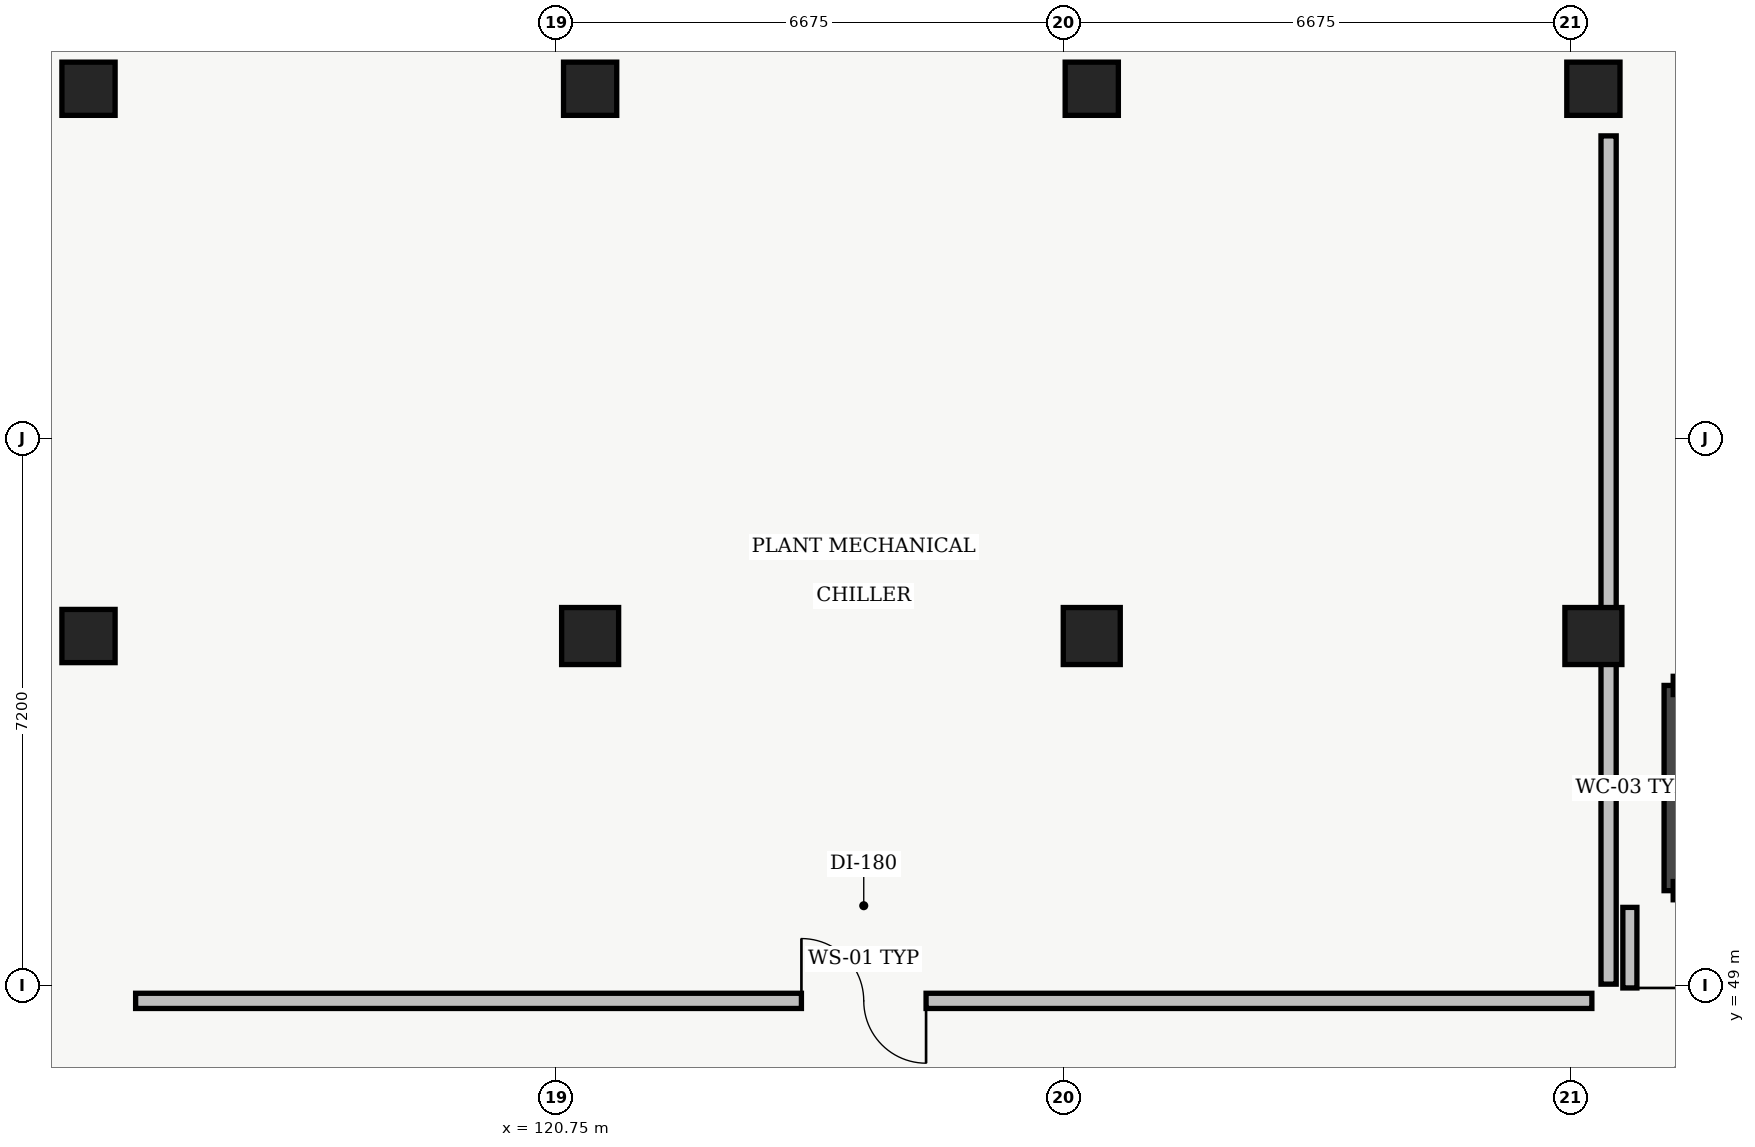
"""IFC4 building model, lengths in metres.
Left out: names, types, materials, properties, quantities, classifications, styles, units other than length and angle.
Written with IfcOpenShell. Run it as: python <this file> out.ifc"""

import sys

from ifc_helpers import new_model, si_unit, direction, frame, frame_2d, origin, origin_2d, place, context, subcontext, project, spatial, rectangle, extrude, element, fill, save


model = new_model("IFC4")
c1 = context("Model", 3, precision=1e-05, world=origin(), true_north=direction((0.0, 1.0)))
c2 = subcontext(c1, "Body", "Model", "MODEL_VIEW")
j1 = project(units=[si_unit("LENGTHUNIT", "METRE"), si_unit("PLANEANGLEUNIT", "RADIAN")], contexts=[c1])
p1 = place(None, origin())
s1 = spatial("IfcSite", under=j1, at=p1, CompositionType="ELEMENT")
p2 = place(p1, origin())
s2 = spatial("IfcBuilding", under=s1, at=p2, CompositionType="ELEMENT")
p3 = place(p2, frame((0.0, 0.0, -4.8)))
s3 = spatial("IfcBuildingStorey", under=s2, at=p3, CompositionType="ELEMENT", Elevation=-4.8)
for number, where, z_axis, x_axis in (
    (1, (114.6, 53.6, 0.0), (0.0, 0.0, 1.0), (1.0, 0.0, 0.0)),
    (2, (114.6, 60.8, 0.0), (0.0, 0.0, 1.0), (1.0, 0.0, 0.0)),
):
    element("IfcColumn", number, at=place(p3, frame(where, z_axis=z_axis, x_axis=x_axis)), inside=s3, PredefinedType="COLUMN", context=c2, shape_type="SweptSolid", body=[
        extrude(rectangle(XDim=0.7, YDim=0.7, at=origin_2d()), origin(), (0.0, 0.0, 1.0), 4.59),
    ])
p4 = place(p3, frame((121.2, 53.6, 0.0), z_axis=(0.0, 0.0, 1.0), x_axis=(1.0, 0.0, 0.0)))
e3 = element("IfcColumn", 3, at=p4, inside=s3, PredefinedType="COLUMN", context=c2, shape_type="SweptSolid", body=[
    extrude(rectangle(XDim=0.75, YDim=0.75, at=origin_2d()), origin(), (0.0, 0.0, 1.0), 4.59),
])
p5 = place(p3, frame((121.2, 60.8, 0.0), z_axis=(0.0, 0.0, 1.0), x_axis=(1.0, 0.0, 0.0)))
e4 = element("IfcColumn", 4, at=p5, inside=s3, PredefinedType="COLUMN", context=c2, shape_type="SweptSolid", body=[
    extrude(rectangle(XDim=0.7, YDim=0.7, at=origin_2d()), origin(), (0.0, 0.0, 1.0), 4.59),
])
p6 = place(p3, frame((127.8, 53.6, 0.0), z_axis=(0.0, 0.0, 1.0), x_axis=(1.0, 0.0, 0.0)))
e5 = element("IfcColumn", 5, at=p6, inside=s3, PredefinedType="COLUMN", context=c2, shape_type="SweptSolid", body=[
    extrude(rectangle(XDim=0.75, YDim=0.75, at=origin_2d()), origin(), (0.0, 0.0, 1.0), 4.59),
])
p7 = place(p3, frame((127.8, 60.8, 0.0), z_axis=(0.0, 0.0, 1.0), x_axis=(1.0, 0.0, 0.0)))
e6 = element("IfcColumn", 6, at=p7, inside=s3, PredefinedType="COLUMN", context=c2, shape_type="SweptSolid", body=[
    extrude(rectangle(XDim=0.7, YDim=0.7, at=origin_2d()), origin(), (0.0, 0.0, 1.0), 4.59),
])
p8 = place(p3, frame((134.4, 53.6, 0.0), z_axis=(0.0, 0.0, 1.0), x_axis=(1.0, 0.0, 0.0)))
e7 = element("IfcColumn", 7, at=p8, inside=s3, PredefinedType="COLUMN", context=c2, shape_type="SweptSolid", body=[
    extrude(rectangle(XDim=0.75, YDim=0.75, at=origin_2d()), origin(), (0.0, 0.0, 1.0), 4.59),
])
p9 = place(p3, frame((134.4, 60.8, 0.0), z_axis=(0.0, 0.0, 1.0), x_axis=(1.0, 0.0, 0.0)))
e8 = element("IfcColumn", 8, at=p9, inside=s3, PredefinedType="COLUMN", context=c2, shape_type="SweptSolid", body=[
    extrude(rectangle(XDim=0.7, YDim=0.7, at=origin_2d()), origin(), (0.0, 0.0, 1.0), 4.59),
])
p10 = place(p3, frame((135.45, 50.25, 0.0), z_axis=(0.0, 0.0, 1.0), x_axis=(0.0, 1.0, 0.0)))
e9 = element("IfcWall", 9, at=p10, inside=s3, PredefinedType="SHEAR", context=c2, shape_type="SweptSolid", body=[
    extrude(rectangle(XDim=2.7, YDim=0.24, at=frame_2d((1.35, 0.0))), origin(), (0.0, 0.0, 1.0), 4.58),
])
p11 = place(p3, frame((135.45, 52.95, 0.0), z_axis=(0.0, 0.0, 1.0), x_axis=(1.0, 0.0, 0.0)))
e10 = element("IfcWall", 10, at=p11, inside=s3, PredefinedType="SHEAR", context=c2, shape_type="SweptSolid", body=[
    extrude(rectangle(XDim=1.9, YDim=0.24, at=frame_2d((0.95, 0.0))), origin(), (0.0, 0.0, 1.0), 4.58),
])
p12 = place(p3, frame((137.35, 50.25, 0.0), z_axis=(0.0, 0.0, 1.0), x_axis=(-1.0, 0.0, 0.0)))
e11 = element("IfcWall", 11, at=p12, inside=s3, PredefinedType="SHEAR", context=c2, shape_type="SweptSolid", body=[
    extrude(rectangle(XDim=1.9, YDim=0.24, at=frame_2d((0.95, 0.0))), origin(), (0.0, 0.0, 1.0), 4.58),
])
p13 = place(p12, frame((0.325, 0.0, 0.0)))
e12 = element("IfcOpeningElement", 12, at=p13, cuts=e11, PredefinedType="OPENING", context=c2, shape_type="SweptSolid", body=[
    extrude(rectangle(XDim=1.25, YDim=2.2, at=frame_2d((0.625, 1.1))), frame((0.0, 0.12, 0.0), z_axis=(0.0, -1.0, 0.0), x_axis=(1.0, 0.0, 0.0)), (0.0, 0.0, 1.0), 0.24),
])
p14 = place(p3, frame((134.88, 50.03, 0.0), z_axis=(0.0, 0.0, 1.0), x_axis=(0.0, -1.0, 0.0)))
e13 = element("IfcWall", 13, at=p14, inside=s3, PredefinedType="SOLIDWALL", context=c2, shape_type="SweptSolid", body=[
    extrude(rectangle(XDim=2.51, YDim=0.185, at=frame_2d((1.255, 0.0))), origin(), (0.0, 0.0, 1.0), 4.25),
])
p15 = place(p14, frame((1.06, 0.0, 0.0)))
e14 = element("IfcOpeningElement", 14, at=p15, cuts=e13, PredefinedType="OPENING", context=c2, shape_type="SweptSolid", body=[
    extrude(rectangle(XDim=1.2, YDim=2.15, at=frame_2d((0.6, 1.075))), frame((0.0, 0.093, 0.0), z_axis=(0.0, -1.0, 0.0), x_axis=(1.0, 0.0, 0.0)), (0.0, 0.0, 1.0), 0.185),
])
p16 = place(p3, frame((115.22, 48.8, 0.0), z_axis=(0.0, 0.0, 1.0), x_axis=(1.0, 0.0, 0.0)))
e15 = element("IfcWall", 15, at=p16, inside=s3, PredefinedType="SOLIDWALL", context=c2, shape_type="SweptSolid", body=[
    extrude(rectangle(XDim=19.16, YDim=0.2, at=frame_2d((9.58, 0.0))), origin(), (0.0, 0.0, 1.0), 4.125),
])
p17 = place(p16, frame((8.76, 0.0, 0.0)))
e16 = element("IfcOpeningElement", 16, at=p17, cuts=e15, PredefinedType="OPENING", context=c2, shape_type="SweptSolid", body=[
    extrude(rectangle(XDim=1.64, YDim=2.2, at=frame_2d((0.82, 1.1))), frame((0.0, 0.1, 0.0), z_axis=(0.0, -1.0, 0.0), x_axis=(1.0, 0.0, 0.0)), (0.0, 0.0, 1.0), 0.2),
])
p18 = place(p3, frame((134.6, 49.02, 0.0), z_axis=(0.0, 0.0, 1.0), x_axis=(0.0, 1.0, 0.0)))
e17 = element("IfcWall", 17, at=p18, inside=s3, PredefinedType="SOLIDWALL", context=c2, shape_type="SweptSolid", body=[
    extrude(rectangle(XDim=11.16, YDim=0.2, at=frame_2d((5.58, 0.0))), origin(), (0.0, 0.0, 1.0), 3.925),
])
p19 = place(p15, origin())
e18 = element("IfcDoor", 18, at=p19, inside=s3, OperationType="SINGLE_SWING_LEFT", PredefinedType="DOOR", context=c2, shape_type="SweptSolid", body=[
    extrude(rectangle(XDim=1.2, YDim=2.15, at=frame_2d((0.6, 1.075))), frame((0.0, 0.025, 0.0), z_axis=(0.0, -1.0, 0.0), x_axis=(1.0, 0.0, 0.0)), (0.0, 0.0, 1.0), 0.05),
])
fill(e14, e18)
p20 = place(p17, origin())
e19 = element("IfcDoor", 19, at=p20, inside=s3, OperationType="DOUBLE_DOOR_SINGLE_SWING", PredefinedType="DOOR", context=c2, shape_type="SweptSolid", body=[
    extrude(rectangle(XDim=1.64, YDim=2.2, at=frame_2d((0.82, 1.1))), frame((0.0, 0.025, 0.0), z_axis=(0.0, -1.0, 0.0), x_axis=(1.0, 0.0, 0.0)), (0.0, 0.0, 1.0), 0.05),
])
fill(e16, e19)
save(model, sys.argv[1])
